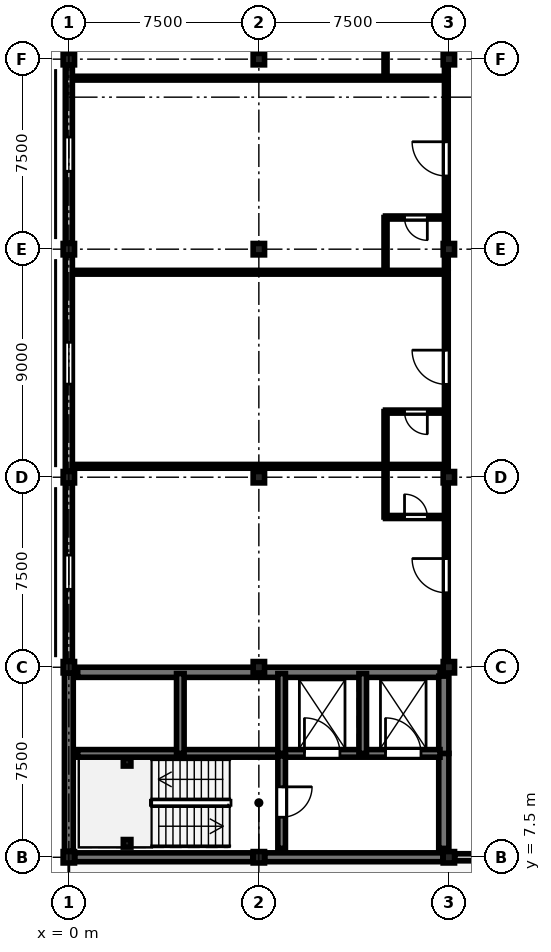
"""IFC4 building model, lengths in metres.
Left out: names, types, materials, properties, quantities, classifications, styles, units other than length and angle.
Written with IfcOpenShell. Run it as: python <this file> out.ifc"""

import sys

from ifc_helpers import new_model, si_unit, direction, frame, frame_2d, origin, origin_2d, place, context, subcontext, project, spatial, rectangle, i_section, extrude, element, fill, save


model = new_model("IFC4")
c1 = context("Model", 3, precision=1e-05, world=origin(), true_north=direction((0.0, 1.0)))
c2 = subcontext(c1, "Body", "Model", "MODEL_VIEW")
j1 = project(units=[si_unit("LENGTHUNIT", "METRE"), si_unit("PLANEANGLEUNIT", "RADIAN")], contexts=[c1])
p1 = place(None, origin())
s1 = spatial("IfcSite", under=j1, at=p1, CompositionType="ELEMENT")
p2 = place(p1, origin())
s2 = spatial("IfcBuilding", under=s1, at=p2, CompositionType="ELEMENT")
p3 = place(p2, frame((0.0, 0.0, 30.0)))
s3 = spatial("IfcBuildingStorey", under=s2, at=p3, CompositionType="ELEMENT", Elevation=30.0)
for number, where, z_axis, x_axis in (
    (1, (0.0, 7.5, 0.0), (0.0, 0.0, 1.0), (1.0, 0.0, 0.0)),
    (2, (0.0, 15.0, 0.0), (0.0, 0.0, 1.0), (1.0, 0.0, 0.0)),
    (3, (0.0, 22.5, 0.0), (0.0, 0.0, 1.0), (1.0, 0.0, 0.0)),
    (4, (0.0, 31.5, 0.0), (0.0, 0.0, 1.0), (1.0, 0.0, 0.0)),
    (5, (0.0, 39.0, 0.0), (0.0, 0.0, 1.0), (1.0, 0.0, 0.0)),
    (6, (7.5, 7.5, 0.0), (0.0, 0.0, 1.0), (1.0, 0.0, 0.0)),
    (7, (7.5, 15.0, 0.0), (0.0, 0.0, 1.0), (1.0, 0.0, 0.0)),
    (8, (7.5, 22.5, 0.0), (0.0, 0.0, 1.0), (1.0, 0.0, 0.0)),
    (9, (7.5, 31.5, 0.0), (0.0, 0.0, 1.0), (1.0, 0.0, 0.0)),
    (10, (7.5, 39.0, 0.0), (0.0, 0.0, 1.0), (1.0, 0.0, 0.0)),
    (11, (15.0, 7.5, 0.0), (0.0, 0.0, 1.0), (1.0, 0.0, 0.0)),
    (12, (15.0, 15.0, 0.0), (0.0, 0.0, 1.0), (1.0, 0.0, 0.0)),
    (13, (15.0, 22.5, 0.0), (0.0, 0.0, 1.0), (1.0, 0.0, 0.0)),
    (14, (15.0, 31.5, 0.0), (0.0, 0.0, 1.0), (1.0, 0.0, 0.0)),
    (15, (15.0, 39.0, 0.0), (0.0, 0.0, 1.0), (1.0, 0.0, 0.0)),
):
    element("IfcColumn", number, at=place(p3, frame(where, z_axis=z_axis, x_axis=x_axis)), inside=s3, PredefinedType="COLUMN", context=c2, shape_type="SweptSolid", body=[
        extrude(rectangle(XDim=0.45, YDim=0.45, at=origin_2d()), origin(), (0.0, 0.0, 1.0), 4.05),
    ])
for number, where, z_axis, x_axis in (
    (16, (2.3, 8.05, 0.0), (0.0, 0.0, 1.0), (1.0, 0.0, 0.0)),
    (17, (2.3, 11.25, 0.0), (0.0, 0.0, 1.0), (1.0, 0.0, 0.0)),
):
    element("IfcColumn", number, at=place(p3, frame(where, z_axis=z_axis, x_axis=x_axis)), inside=s3, PredefinedType="COLUMN", context=c2, shape_type="SweptSolid", body=[
        extrude(i_section(OverallWidth=0.3, OverallDepth=0.3, WebThickness=0.011, FlangeThickness=0.019, FilletRadius=0.027, at=origin_2d()), origin(), (0.0, 0.0, 1.0), 4.05),
    ])
for number, where, z_axis, x_axis in (
    (18, (7.265, 7.5, 0.0), (0.0, 0.0, 1.0), (-1.0, 0.0, 0.0)),
    (19, (0.0, 7.735, 0.0), (0.0, 0.0, 1.0), (0.0, 1.0, 0.0)),
):
    element("IfcWall", number, at=place(p3, frame(where, z_axis=z_axis, x_axis=x_axis)), inside=s3, PredefinedType="SHEAR", context=c2, shape_type="SweptSolid", body=[
        extrude(rectangle(XDim=7.03, YDim=0.35, at=frame_2d((3.515, 0.0))), origin(), (0.0, 0.0, 1.0), 3.83),
    ])
p4 = place(p3, frame((0.0, 15.235, 0.0), z_axis=(0.0, 0.0, 1.0), x_axis=(0.0, 1.0, 0.0)))
e20 = element("IfcWall", 20, at=p4, inside=s3, PredefinedType="STANDARD", context=c2, shape_type="SweptSolid", body=[
    extrude(rectangle(XDim=7.03, YDim=0.28, at=frame_2d((3.515, 0.0))), origin(), (0.0, 0.0, 1.0), 3.83),
])
p5 = place(p4, frame((2.84, 0.0, 0.85)))
e21 = element("IfcOpeningElement", 21, at=p5, cuts=e20, PredefinedType="OPENING", context=c2, shape_type="SweptSolid", body=[
    extrude(rectangle(XDim=1.35, YDim=2.25, at=frame_2d((0.675, 1.125))), frame((0.0, 0.15, 0.0), z_axis=(0.0, -1.0, 0.0), x_axis=(1.0, 0.0, 0.0)), (0.0, 0.0, 1.0), 0.3),
])
p6 = place(p3, frame((0.0, 22.735, 0.0), z_axis=(0.0, 0.0, 1.0), x_axis=(0.0, 1.0, 0.0)))
e22 = element("IfcWall", 22, at=p6, inside=s3, PredefinedType="STANDARD", context=c2, shape_type="SweptSolid", body=[
    extrude(rectangle(XDim=8.53, YDim=0.28, at=frame_2d((4.265, 0.0))), origin(), (0.0, 0.0, 1.0), 3.83),
])
p7 = place(p6, frame((3.44, 0.0, 0.85)))
e23 = element("IfcOpeningElement", 23, at=p7, cuts=e22, PredefinedType="OPENING", context=c2, shape_type="SweptSolid", body=[
    extrude(rectangle(XDim=1.65, YDim=2.25, at=frame_2d((0.825, 1.125))), frame((0.0, 0.15, 0.0), z_axis=(0.0, -1.0, 0.0), x_axis=(1.0, 0.0, 0.0)), (0.0, 0.0, 1.0), 0.3),
])
p8 = place(p3, frame((0.0, 31.735, 0.0), z_axis=(0.0, 0.0, 1.0), x_axis=(0.0, 1.0, 0.0)))
e24 = element("IfcWall", 24, at=p8, inside=s3, PredefinedType="STANDARD", context=c2, shape_type="SweptSolid", body=[
    extrude(rectangle(XDim=7.03, YDim=0.28, at=frame_2d((3.515, 0.0))), origin(), (0.0, 0.0, 1.0), 3.83),
])
p9 = place(p8, frame((2.84, 0.0, 0.85)))
e25 = element("IfcOpeningElement", 25, at=p9, cuts=e24, PredefinedType="OPENING", context=c2, shape_type="SweptSolid", body=[
    extrude(rectangle(XDim=1.35, YDim=2.25, at=frame_2d((0.675, 1.125))), frame((0.0, 0.15, 0.0), z_axis=(0.0, -1.0, 0.0), x_axis=(1.0, 0.0, 0.0)), (0.0, 0.0, 1.0), 0.3),
])
p10 = place(p3, frame((0.0, 39.235, 0.0), z_axis=(0.0, 0.0, 1.0), x_axis=(0.0, 1.0, 0.0)))
e26 = element("IfcWall", 26, at=p10, inside=s3, PredefinedType="STANDARD", context=c2, shape_type="SweptSolid", body=[
    extrude(rectangle(XDim=7.03, YDim=0.28, at=frame_2d((3.515, 0.0))), origin(), (0.0, 0.0, 1.0), 3.83),
])
p11 = place(p10, frame((2.69, 0.0, 0.85)))
e27 = element("IfcOpeningElement", 27, at=p11, cuts=e26, PredefinedType="OPENING", context=c2, shape_type="SweptSolid", body=[
    extrude(rectangle(XDim=1.65, YDim=2.25, at=frame_2d((0.825, 1.125))), frame((0.0, 0.15, 0.0), z_axis=(0.0, -1.0, 0.0), x_axis=(1.0, 0.0, 0.0)), (0.0, 0.0, 1.0), 0.3),
])
p12 = place(p3, frame((14.765, 7.5, 0.0), z_axis=(0.0, 0.0, 1.0), x_axis=(-1.0, 0.0, 0.0)))
e28 = element("IfcWall", 28, at=p12, inside=s3, PredefinedType="SHEAR", context=c2, shape_type="SweptSolid", body=[
    extrude(rectangle(XDim=7.03, YDim=0.35, at=frame_2d((3.515, 0.0))), origin(), (0.0, 0.0, 1.0), 3.83),
])
p13 = place(p3, frame((22.265, 7.5, 0.0), z_axis=(0.0, 0.0, 1.0), x_axis=(-1.0, 0.0, 0.0)))
e29 = element("IfcWall", 29, at=p13, inside=s3, PredefinedType="STANDARD", context=c2, shape_type="SweptSolid", body=[
    extrude(rectangle(XDim=7.03, YDim=0.28, at=frame_2d((3.515, 0.0))), origin(), (0.0, 0.0, 1.0), 3.23),
])
p14 = place(p13, frame((2.915, 0.0, 0.0)))
e30 = element("IfcOpeningElement", 30, at=p14, cuts=e29, PredefinedType="OPENING", context=c2, shape_type="SweptSolid", body=[
    extrude(rectangle(XDim=1.2, YDim=2.3, at=frame_2d((0.6, 1.15))), frame((0.0, 0.15, 0.0), z_axis=(0.0, -1.0, 0.0), x_axis=(1.0, 0.0, 0.0)), (0.0, 0.0, 1.0), 0.3),
])
p15 = place(p3, frame((0.35, 14.8, 0.0), z_axis=(0.0, 0.0, 1.0), x_axis=(1.0, 0.0, 0.0)))
e31 = element("IfcWall", 31, at=p15, inside=s3, PredefinedType="SHEAR", context=c2, shape_type="SweptSolid", body=[
    extrude(rectangle(XDim=14.3, YDim=0.4, at=frame_2d((7.15, 0.0))), origin(), (0.0, 0.0, 1.0), 3.83),
])
p16 = place(p3, frame((14.8, 7.85, 0.0), z_axis=(0.0, 0.0, 1.0), x_axis=(0.0, 1.0, 0.0)))
e32 = element("IfcWall", 32, at=p16, inside=s3, PredefinedType="SHEAR", context=c2, shape_type="SweptSolid", body=[
    extrude(rectangle(XDim=3.75, YDim=0.4, at=frame_2d((1.875, 0.0))), origin(), (0.0, 0.0, 1.0), 3.83),
])
p17 = place(p3, frame((14.8, 11.6, 0.0), z_axis=(0.0, 0.0, 1.0), x_axis=(0.0, 1.0, 0.0)))
e33 = element("IfcWall", 33, at=p17, inside=s3, PredefinedType="SHEAR", context=c2, shape_type="SweptSolid", body=[
    extrude(rectangle(XDim=3.05, YDim=0.4, at=frame_2d((1.525, 0.0))), origin(), (0.0, 0.0, 1.0), 3.83),
])
p18 = place(p3, frame((0.35, 11.6, 0.0), z_axis=(0.0, 0.0, 1.0), x_axis=(1.0, 0.0, 0.0)))
e34 = element("IfcWall", 34, at=p18, inside=s3, PredefinedType="SHEAR", context=c2, shape_type="SweptSolid", body=[
    extrude(rectangle(XDim=8.05, YDim=0.3, at=frame_2d((4.025, 0.0))), origin(), (0.0, 0.0, 1.0), 3.83),
])
p19 = place(p3, frame((8.4, 11.6, 0.0), z_axis=(0.0, 0.0, 1.0), x_axis=(1.0, 0.0, 0.0)))
e35 = element("IfcWall", 35, at=p19, inside=s3, PredefinedType="SHEAR", context=c2, shape_type="SweptSolid", body=[
    extrude(rectangle(XDim=6.25, YDim=0.3, at=frame_2d((3.125, 0.0))), origin(), (0.0, 0.0, 1.0), 3.83),
])
p20 = place(p19, frame((0.9, 0.0, 0.0)))
e36 = element("IfcOpeningElement", 36, at=p20, cuts=e35, PredefinedType="OPENING", context=c2, shape_type="SweptSolid", body=[
    extrude(rectangle(XDim=1.4, YDim=2.25, at=frame_2d((0.7, 1.125))), frame((0.0, 0.16, 0.0), z_axis=(0.0, -1.0, 0.0), x_axis=(1.0, 0.0, 0.0)), (0.0, 0.0, 1.0), 0.32),
])
p21 = place(p19, frame((4.1, 0.0, 0.0)))
e37 = element("IfcOpeningElement", 37, at=p21, cuts=e35, PredefinedType="OPENING", context=c2, shape_type="SweptSolid", body=[
    extrude(rectangle(XDim=1.4, YDim=2.25, at=frame_2d((0.7, 1.125))), frame((0.0, 0.16, 0.0), z_axis=(0.0, -1.0, 0.0), x_axis=(1.0, 0.0, 0.0)), (0.0, 0.0, 1.0), 0.32),
])
p22 = place(p3, frame((8.4, 11.5, 0.0), z_axis=(0.0, 0.0, 1.0), x_axis=(0.0, -1.0, 0.0)))
e38 = element("IfcWall", 38, at=p22, inside=s3, PredefinedType="SHEAR", context=c2, shape_type="SweptSolid", body=[
    extrude(rectangle(XDim=3.65, YDim=0.3, at=frame_2d((1.825, 0.0))), origin(), (0.0, 0.0, 1.0), 3.83),
])
p23 = place(p22, frame((1.22, 0.0, 0.0)))
e39 = element("IfcOpeningElement", 39, at=p23, cuts=e38, PredefinedType="OPENING", context=c2, shape_type="SweptSolid", body=[
    extrude(rectangle(XDim=1.2, YDim=2.25, at=frame_2d((0.6, 1.125))), frame((0.0, 0.16, 0.0), z_axis=(0.0, -1.0, 0.0), x_axis=(1.0, 0.0, 0.0)), (0.0, 0.0, 1.0), 0.32),
])
for number, where, z_axis, x_axis in (
    (40, (4.4, 11.6, 0.0), (0.0, 0.0, 1.0), (0.0, 1.0, 0.0)),
    (41, (8.4, 11.6, 0.0), (0.0, 0.0, 1.0), (0.0, 1.0, 0.0)),
    (42, (11.6, 11.6, 0.0), (0.0, 0.0, 1.0), (0.0, 1.0, 0.0)),
):
    element("IfcWall", number, at=place(p3, frame(where, z_axis=z_axis, x_axis=x_axis)), inside=s3, PredefinedType="SHEAR", context=c2, shape_type="SweptSolid", body=[
        extrude(rectangle(XDim=3.15, YDim=0.3, at=frame_2d((1.575, 0.0))), origin(), (0.0, 0.0, 1.0), 3.83),
    ])
p24 = place(p3, frame((14.9, 15.43, 0.0), z_axis=(0.0, 0.0, 1.0), x_axis=(0.0, 1.0, 0.0)))
e43 = element("IfcWall", 43, at=p24, inside=s3, PredefinedType="PARTITIONING", context=c2, shape_type="SweptSolid", body=[
    extrude(rectangle(XDim=7.5, YDim=0.15, at=frame_2d((3.75, 0.0))), origin(), (0.0, 0.0, 1.0), 3.815),
])
p25 = place(p24, frame((2.51, 0.0, 0.0)))
e44 = element("IfcOpeningElement", 44, at=p25, cuts=e43, PredefinedType="OPENING", context=c2, shape_type="SweptSolid", body=[
    extrude(rectangle(XDim=1.35, YDim=2.25, at=frame_2d((0.675, 1.125))), frame((0.0, 0.085, 0.0), z_axis=(0.0, -1.0, 0.0), x_axis=(1.0, 0.0, 0.0)), (0.0, 0.0, 1.0), 0.17),
])
p26 = place(p3, frame((12.5, 20.93, 0.0), z_axis=(0.0, 0.0, 1.0), x_axis=(1.0, 0.0, 0.0)))
e45 = element("IfcWall", 45, at=p26, inside=s3, PredefinedType="PARTITIONING", context=c2, shape_type="SweptSolid", body=[
    extrude(rectangle(XDim=2.4, YDim=0.12, at=frame_2d((1.2, 0.0))), origin(), (0.0, 0.0, 1.0), 3.815),
])
p27 = place(p26, frame((0.75, 0.0, 0.0)))
e46 = element("IfcOpeningElement", 46, at=p27, cuts=e45, PredefinedType="OPENING", context=c2, shape_type="SweptSolid", body=[
    extrude(rectangle(XDim=0.9, YDim=2.1, at=frame_2d((0.45, 1.05))), frame((0.0, 0.07, 0.0), z_axis=(0.0, -1.0, 0.0), x_axis=(1.0, 0.0, 0.0)), (0.0, 0.0, 1.0), 0.14),
])
p28 = place(p3, frame((12.5, 20.93, 0.0), z_axis=(0.0, 0.0, 1.0), x_axis=(0.0, 1.0, 0.0)))
e47 = element("IfcWall", 47, at=p28, inside=s3, PredefinedType="PARTITIONING", context=c2, shape_type="SweptSolid", body=[
    extrude(rectangle(XDim=2.0, YDim=0.12, at=frame_2d((1.0, 0.0))), origin(), (0.0, 0.0, 1.0), 3.815),
])
p29 = place(p3, frame((14.9, 23.09, 0.0), z_axis=(0.0, 0.0, 1.0), x_axis=(0.0, 1.0, 0.0)))
e48 = element("IfcWall", 48, at=p29, inside=s3, PredefinedType="PARTITIONING", context=c2, shape_type="SweptSolid", body=[
    extrude(rectangle(XDim=7.5, YDim=0.15, at=frame_2d((3.75, 0.0))), origin(), (0.0, 0.0, 1.0), 3.815),
])
p30 = place(p29, frame((3.075, 0.0, 0.0)))
e49 = element("IfcOpeningElement", 49, at=p30, cuts=e48, PredefinedType="OPENING", context=c2, shape_type="SweptSolid", body=[
    extrude(rectangle(XDim=1.35, YDim=2.25, at=frame_2d((0.675, 1.125))), frame((0.0, 0.085, 0.0), z_axis=(0.0, -1.0, 0.0), x_axis=(1.0, 0.0, 0.0)), (0.0, 0.0, 1.0), 0.17),
])
p31 = place(p3, frame((14.9, 25.09, 0.0), z_axis=(0.0, 0.0, 1.0), x_axis=(-1.0, 0.0, 0.0)))
e50 = element("IfcWall", 50, at=p31, inside=s3, PredefinedType="PARTITIONING", context=c2, shape_type="SweptSolid", body=[
    extrude(rectangle(XDim=2.4, YDim=0.12, at=frame_2d((1.2, 0.0))), origin(), (0.0, 0.0, 1.0), 3.815),
])
p32 = place(p31, frame((0.75, 0.0, 0.0)))
e51 = element("IfcOpeningElement", 51, at=p32, cuts=e50, PredefinedType="OPENING", context=c2, shape_type="SweptSolid", body=[
    extrude(rectangle(XDim=0.9, YDim=2.1, at=frame_2d((0.45, 1.05))), frame((0.0, 0.07, 0.0), z_axis=(0.0, -1.0, 0.0), x_axis=(1.0, 0.0, 0.0)), (0.0, 0.0, 1.0), 0.14),
])
p33 = place(p3, frame((12.5, 23.09, 0.0), z_axis=(0.0, 0.0, 1.0), x_axis=(0.0, 1.0, 0.0)))
e52 = element("IfcWall", 52, at=p33, inside=s3, PredefinedType="PARTITIONING", context=c2, shape_type="SweptSolid", body=[
    extrude(rectangle(XDim=2.0, YDim=0.12, at=frame_2d((1.0, 0.0))), origin(), (0.0, 0.0, 1.0), 3.815),
])
p34 = place(p3, frame((14.9, 30.75, 0.0), z_axis=(0.0, 0.0, 1.0), x_axis=(0.0, 1.0, 0.0)))
e53 = element("IfcWall", 53, at=p34, inside=s3, PredefinedType="PARTITIONING", context=c2, shape_type="SweptSolid", body=[
    extrude(rectangle(XDim=7.5, YDim=0.15, at=frame_2d((3.75, 0.0))), origin(), (0.0, 0.0, 1.0), 3.815),
])
p35 = place(p34, frame((3.64, 0.0, 0.0)))
e54 = element("IfcOpeningElement", 54, at=p35, cuts=e53, PredefinedType="OPENING", context=c2, shape_type="SweptSolid", body=[
    extrude(rectangle(XDim=1.35, YDim=2.25, at=frame_2d((0.675, 1.125))), frame((0.0, 0.085, 0.0), z_axis=(0.0, -1.0, 0.0), x_axis=(1.0, 0.0, 0.0)), (0.0, 0.0, 1.0), 0.17),
])
p36 = place(p3, frame((14.9, 32.75, 0.0), z_axis=(0.0, 0.0, 1.0), x_axis=(-1.0, 0.0, 0.0)))
e55 = element("IfcWall", 55, at=p36, inside=s3, PredefinedType="PARTITIONING", context=c2, shape_type="SweptSolid", body=[
    extrude(rectangle(XDim=2.4, YDim=0.12, at=frame_2d((1.2, 0.0))), origin(), (0.0, 0.0, 1.0), 3.815),
])
p37 = place(p36, frame((0.75, 0.0, 0.0)))
e56 = element("IfcOpeningElement", 56, at=p37, cuts=e55, PredefinedType="OPENING", context=c2, shape_type="SweptSolid", body=[
    extrude(rectangle(XDim=0.9, YDim=2.1, at=frame_2d((0.45, 1.05))), frame((0.0, 0.07, 0.0), z_axis=(0.0, -1.0, 0.0), x_axis=(1.0, 0.0, 0.0)), (0.0, 0.0, 1.0), 0.14),
])
p38 = place(p3, frame((12.5, 30.75, 0.0), z_axis=(0.0, 0.0, 1.0), x_axis=(0.0, 1.0, 0.0)))
e57 = element("IfcWall", 57, at=p38, inside=s3, PredefinedType="PARTITIONING", context=c2, shape_type="SweptSolid", body=[
    extrude(rectangle(XDim=2.0, YDim=0.12, at=frame_2d((1.0, 0.0))), origin(), (0.0, 0.0, 1.0), 3.815),
])
p39 = place(p3, frame((14.9, 38.41, 0.0), z_axis=(0.0, 0.0, 1.0), x_axis=(0.0, 1.0, 0.0)))
e58 = element("IfcWall", 58, at=p39, inside=s3, PredefinedType="PARTITIONING", context=c2, shape_type="SweptSolid", body=[
    extrude(rectangle(XDim=7.5, YDim=0.15, at=frame_2d((3.75, 0.0))), origin(), (0.0, 0.0, 1.0), 3.815),
])
p40 = place(p39, frame((3.64, 0.0, 0.0)))
e59 = element("IfcOpeningElement", 59, at=p40, cuts=e58, PredefinedType="OPENING", context=c2, shape_type="SweptSolid", body=[
    extrude(rectangle(XDim=1.35, YDim=2.25, at=frame_2d((0.675, 1.125))), frame((0.0, 0.085, 0.0), z_axis=(0.0, -1.0, 0.0), x_axis=(1.0, 0.0, 0.0)), (0.0, 0.0, 1.0), 0.17),
])
p41 = place(p3, frame((12.5, 38.41, 0.0), z_axis=(0.0, 0.0, 1.0), x_axis=(0.0, 1.0, 0.0)))
e60 = element("IfcWall", 60, at=p41, inside=s3, PredefinedType="PARTITIONING", context=c2, shape_type="SweptSolid", body=[
    extrude(rectangle(XDim=2.0, YDim=0.12, at=frame_2d((1.0, 0.0))), origin(), (0.0, 0.0, 1.0), 3.815),
])
for number, where, z_axis, x_axis in (
    (61, (0.35, 22.93, 0.0), (0.0, 0.0, 1.0), (1.0, 0.0, 0.0)),
    (62, (0.35, 30.59, 0.0), (0.0, 0.0, 1.0), (1.0, 0.0, 0.0)),
    (63, (0.35, 38.25, 0.0), (0.0, 0.0, 1.0), (1.0, 0.0, 0.0)),
):
    element("IfcWall", number, at=place(p3, frame(where, z_axis=z_axis, x_axis=x_axis)), inside=s3, PredefinedType="PARTITIONING", context=c2, shape_type="SweptSolid", body=[
        extrude(rectangle(XDim=14.55, YDim=0.15, at=frame_2d((7.275, 0.0))), origin(), (0.0, 0.0, 1.0), 3.815),
    ])
p42 = place(p5, origin())
e64 = element("IfcWindow", 64, at=p42, inside=s3, PartitioningType="SINGLE_PANEL", PredefinedType="WINDOW", context=c2, shape_type="SweptSolid", body=[
    extrude(rectangle(XDim=1.35, YDim=2.25, at=frame_2d((0.675, 1.125))), frame((0.0, 0.03, 0.0), z_axis=(0.0, -1.0, 0.0), x_axis=(1.0, 0.0, 0.0)), (0.0, 0.0, 1.0), 0.06),
])
fill(e21, e64)
p43 = place(p7, origin())
e65 = element("IfcWindow", 65, at=p43, inside=s3, PartitioningType="SINGLE_PANEL", PredefinedType="WINDOW", context=c2, shape_type="SweptSolid", body=[
    extrude(rectangle(XDim=1.65, YDim=2.25, at=frame_2d((0.825, 1.125))), frame((0.0, 0.03, 0.0), z_axis=(0.0, -1.0, 0.0), x_axis=(1.0, 0.0, 0.0)), (0.0, 0.0, 1.0), 0.06),
])
fill(e23, e65)
p44 = place(p9, origin())
e66 = element("IfcWindow", 66, at=p44, inside=s3, PartitioningType="SINGLE_PANEL", PredefinedType="WINDOW", context=c2, shape_type="SweptSolid", body=[
    extrude(rectangle(XDim=1.35, YDim=2.25, at=frame_2d((0.675, 1.125))), frame((0.0, 0.03, 0.0), z_axis=(0.0, -1.0, 0.0), x_axis=(1.0, 0.0, 0.0)), (0.0, 0.0, 1.0), 0.06),
])
fill(e25, e66)
p45 = place(p20, origin())
e67 = element("IfcDoor", 67, at=p45, inside=s3, OperationType="DOUBLE_DOOR_SLIDING", PredefinedType="DOOR", context=c2, shape_type="SweptSolid", body=[
    extrude(rectangle(XDim=1.4, YDim=2.25, at=frame_2d((0.7, 1.125))), frame((0.0, 0.025, 0.0), z_axis=(0.0, -1.0, 0.0), x_axis=(1.0, 0.0, 0.0)), (0.0, 0.0, 1.0), 0.05),
])
fill(e36, e67)
p46 = place(p21, origin())
e68 = element("IfcDoor", 68, at=p46, inside=s3, OperationType="DOUBLE_DOOR_SLIDING", PredefinedType="DOOR", context=c2, shape_type="SweptSolid", body=[
    extrude(rectangle(XDim=1.4, YDim=2.25, at=frame_2d((0.7, 1.125))), frame((0.0, 0.025, 0.0), z_axis=(0.0, -1.0, 0.0), x_axis=(1.0, 0.0, 0.0)), (0.0, 0.0, 1.0), 0.05),
])
fill(e37, e68)
p47 = place(p23, origin())
e69 = element("IfcDoor", 69, at=p47, inside=s3, OperationType="SINGLE_SWING_LEFT", PredefinedType="DOOR", context=c2, shape_type="SweptSolid", body=[
    extrude(rectangle(XDim=1.2, YDim=2.25, at=frame_2d((0.6, 1.125))), frame((0.0, 0.025, 0.0), z_axis=(0.0, -1.0, 0.0), x_axis=(1.0, 0.0, 0.0)), (0.0, 0.0, 1.0), 0.05),
])
fill(e39, e69)
p48 = place(p25, origin())
e70 = element("IfcDoor", 70, at=p48, inside=s3, OperationType="SINGLE_SWING_RIGHT", PredefinedType="DOOR", context=c2, shape_type="SweptSolid", body=[
    extrude(rectangle(XDim=1.35, YDim=2.25, at=frame_2d((0.675, 1.125))), frame((0.0, 0.025, 0.0), z_axis=(0.0, -1.0, 0.0), x_axis=(1.0, 0.0, 0.0)), (0.0, 0.0, 1.0), 0.05),
])
fill(e44, e70)
p49 = place(p27, origin())
e71 = element("IfcDoor", 71, at=p49, inside=s3, OperationType="SINGLE_SWING_LEFT", PredefinedType="DOOR", context=c2, shape_type="SweptSolid", body=[
    extrude(rectangle(XDim=0.9, YDim=2.1, at=frame_2d((0.45, 1.05))), frame((0.0, 0.025, 0.0), z_axis=(0.0, -1.0, 0.0), x_axis=(1.0, 0.0, 0.0)), (0.0, 0.0, 1.0), 0.05),
])
fill(e46, e71)
p50 = place(p30, origin())
e72 = element("IfcDoor", 72, at=p50, inside=s3, OperationType="SINGLE_SWING_RIGHT", PredefinedType="DOOR", context=c2, shape_type="SweptSolid", body=[
    extrude(rectangle(XDim=1.35, YDim=2.25, at=frame_2d((0.675, 1.125))), frame((0.0, 0.025, 0.0), z_axis=(0.0, -1.0, 0.0), x_axis=(1.0, 0.0, 0.0)), (0.0, 0.0, 1.0), 0.05),
])
fill(e49, e72)
p51 = place(p32, origin())
e73 = element("IfcDoor", 73, at=p51, inside=s3, OperationType="SINGLE_SWING_LEFT", PredefinedType="DOOR", context=c2, shape_type="SweptSolid", body=[
    extrude(rectangle(XDim=0.9, YDim=2.1, at=frame_2d((0.45, 1.05))), frame((0.0, 0.025, 0.0), z_axis=(0.0, -1.0, 0.0), x_axis=(1.0, 0.0, 0.0)), (0.0, 0.0, 1.0), 0.05),
])
fill(e51, e73)
p52 = place(p35, origin())
e74 = element("IfcDoor", 74, at=p52, inside=s3, OperationType="SINGLE_SWING_RIGHT", PredefinedType="DOOR", context=c2, shape_type="SweptSolid", body=[
    extrude(rectangle(XDim=1.35, YDim=2.25, at=frame_2d((0.675, 1.125))), frame((0.0, 0.025, 0.0), z_axis=(0.0, -1.0, 0.0), x_axis=(1.0, 0.0, 0.0)), (0.0, 0.0, 1.0), 0.05),
])
fill(e54, e74)
p53 = place(p37, origin())
e75 = element("IfcDoor", 75, at=p53, inside=s3, OperationType="SINGLE_SWING_LEFT", PredefinedType="DOOR", context=c2, shape_type="SweptSolid", body=[
    extrude(rectangle(XDim=0.9, YDim=2.1, at=frame_2d((0.45, 1.05))), frame((0.0, 0.025, 0.0), z_axis=(0.0, -1.0, 0.0), x_axis=(1.0, 0.0, 0.0)), (0.0, 0.0, 1.0), 0.05),
])
fill(e56, e75)
save(model, sys.argv[1])
